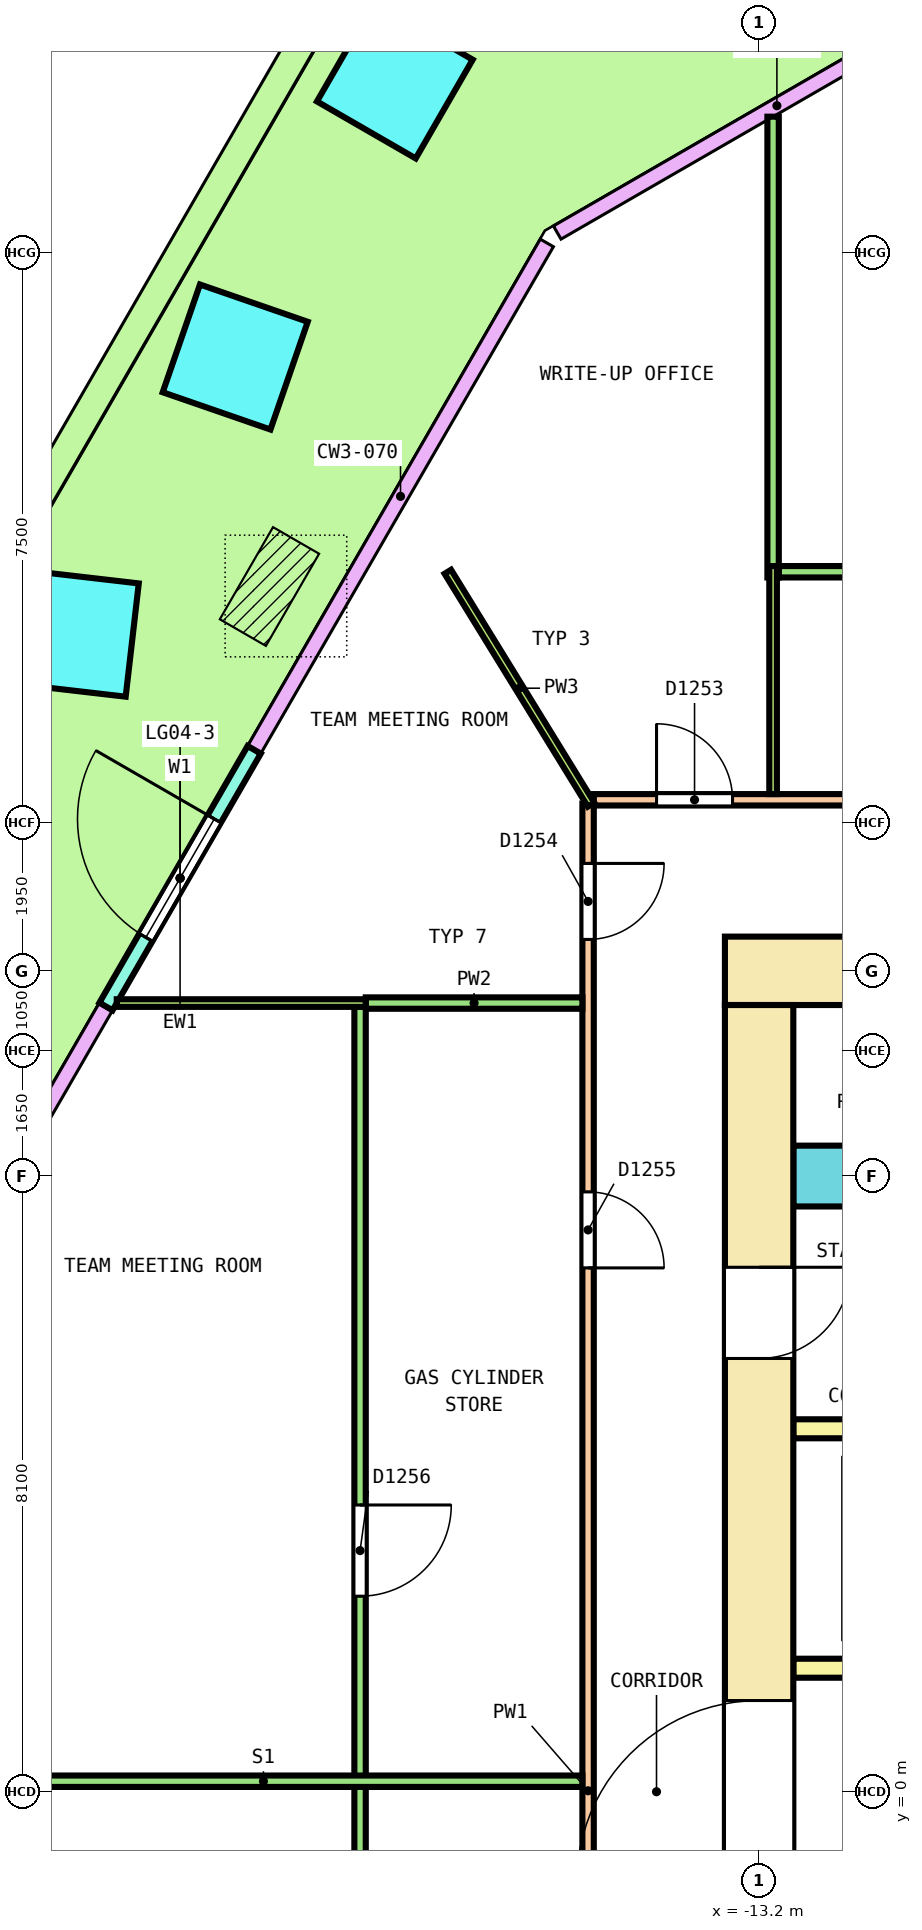
"""IFC4 building model, lengths in metres.
Left out: names, types, materials, properties, quantities, classifications, styles, units other than length and angle.
Written with IfcOpenShell. Run it as: python <this file> out.ifc"""

import sys

from ifc_helpers import new_model, si_unit, direction, frame, frame_2d, origin, origin_2d, place, context, subcontext, project, spatial, rectangle, extrude, element, fill, save


model = new_model("IFC4")
c1 = context("Model", 3, precision=1e-05, world=origin(), true_north=direction((0.0, 1.0)))
c2 = subcontext(c1, "Body", "Model", "MODEL_VIEW")
j1 = project(units=[si_unit("LENGTHUNIT", "METRE"), si_unit("PLANEANGLEUNIT", "RADIAN")], contexts=[c1])
p1 = place(None, origin())
s1 = spatial("IfcSite", under=j1, at=p1, CompositionType="ELEMENT")
p2 = place(p1, origin())
s2 = spatial("IfcBuilding", under=s1, at=p2, CompositionType="ELEMENT")
p3 = place(p2, frame((0.0, 0.0, 19.0)))
s3 = spatial("IfcBuildingStorey", under=s2, at=p3, CompositionType="ELEMENT", Elevation=19.0)
p4 = place(p3, frame((-17.993, 22.512, 0.0), z_axis=(-0.036265236264, 0.0, 0.999342199969), x_axis=(-0.499424867419, -0.866167613071, -0.018123682572)))
e1 = element("IfcColumn", 1, at=p4, inside=s3, PredefinedType="COLUMN", context=c2, shape_type="SweptSolid", body=[
    extrude(rectangle(XDim=1.5, YDim=1.5, at=origin_2d()), origin(), (0.0, 0.0, 1.0), 4.053),
])
p5 = place(p3, frame((-20.093, 18.875, 0.0), z_axis=(-0.032654174822, 0.006325993277, 0.999446690262), x_axis=(-0.500478631698, -0.865680616164, -0.010872442804)))
e2 = element("IfcColumn", 2, at=p5, inside=s3, PredefinedType="COLUMN", context=c2, shape_type="SweptSolid", body=[
    extrude(rectangle(XDim=1.5, YDim=1.5, at=origin_2d()), origin(), (0.0, 0.0, 1.0), 4.052),
])
p6 = place(p3, frame((-22.193, 15.238, 0.0), z_axis=(-0.029040838643, 0.012592396839, 0.999498905068), x_axis=(-0.500555205851, -0.86569697754, -0.003637165647)))
e3 = element("IfcColumn", 3, at=p6, inside=s3, PredefinedType="COLUMN", context=c2, shape_type="SweptSolid", body=[
    extrude(rectangle(XDim=1.5, YDim=1.5, at=origin_2d()), origin(), (0.0, 0.0, 1.0), 4.052),
])
p7 = place(p3, frame((-19.843, 13.708, 0.0), z_axis=(0.0, 0.0, 1.0), x_axis=(-0.499997012787, -0.866027128446, 0.0)))
e4 = element("IfcWall", 4, at=p7, inside=s3, PredefinedType="SOLIDWALL", context=c2, shape_type="SweptSolid", body=[
    extrude(rectangle(XDim=3.9, YDim=0.2, at=frame_2d((1.95, 0.0))), origin(), (0.0, 0.0, 1.0), 4.1),
])
p8 = place(p7, frame((1.05, 0.0, 0.0)))
e5 = element("IfcOpeningElement", 5, at=p8, cuts=e4, PredefinedType="OPENING", context=c2, shape_type="SweptSolid", body=[
    extrude(rectangle(XDim=1.8, YDim=2.4, at=frame_2d((0.9, 1.2))), frame((0.0, 0.11, 0.0), z_axis=(0.0, -1.0, 0.0), x_axis=(1.0, 0.0, 0.0)), (0.0, 0.0, 1.0), 0.22),
])
p9 = place(p7, frame((1.05, 0.0, 2.55)))
e6 = element("IfcOpeningElement", 6, at=p9, cuts=e4, PredefinedType="OPENING", context=c2, shape_type="SweptSolid", body=[
    extrude(rectangle(XDim=1.8, YDim=0.45, at=frame_2d((0.9, 0.225))), frame((0.0, 0.11, 0.0), z_axis=(0.0, -1.0, 0.0), x_axis=(1.0, 0.0, 0.0)), (0.0, 0.0, 1.0), 0.22),
])
p10 = place(p3, frame((-13.65, 10.8, 0.0), z_axis=(0.0, 0.0, 1.0), x_axis=(1.0, 0.0, 0.0)))
e7 = element("IfcWall", 7, at=p10, inside=s3, PredefinedType="SHEAR", context=c2, shape_type="SweptSolid", body=[
    extrude(rectangle(XDim=27.3, YDim=0.9, at=frame_2d((13.65, 0.0))), origin(), (0.0, 0.0, 1.0), 4.1),
])
p11 = place(p10, frame((1.892, 0.0, 0.0)))
e8 = element("IfcOpeningElement", 8, at=p11, cuts=e7, PredefinedType="OPENING", context=c2, shape_type="SweptSolid", body=[
    extrude(rectangle(XDim=1.0, YDim=2.1, at=frame_2d((0.5, 1.05))), frame((0.0, 0.46, 0.0), z_axis=(0.0, -1.0, 0.0), x_axis=(1.0, 0.0, 0.0)), (0.0, 0.0, 1.0), 0.92),
])
p12 = place(p10, frame((4.97, 0.0, 0.0)))
e9 = element("IfcOpeningElement", 9, at=p12, cuts=e7, PredefinedType="OPENING", context=c2, shape_type="SweptSolid", body=[
    extrude(rectangle(XDim=1.0, YDim=2.1, at=frame_2d((0.5, 1.05))), frame((0.0, 0.46, 0.0), z_axis=(0.0, -1.0, 0.0), x_axis=(1.0, 0.0, 0.0)), (0.0, 0.0, 1.0), 0.92),
])
p13 = place(p10, frame((8.017, 0.0, 0.0)))
e10 = element("IfcOpeningElement", 10, at=p13, cuts=e7, PredefinedType="OPENING", context=c2, shape_type="SweptSolid", body=[
    extrude(rectangle(XDim=1.0, YDim=2.1, at=frame_2d((0.5, 1.05))), frame((0.0, 0.46, 0.0), z_axis=(0.0, -1.0, 0.0), x_axis=(1.0, 0.0, 0.0)), (0.0, 0.0, 1.0), 0.92),
])
p14 = place(p10, frame((11.064, 0.0, 0.0)))
e11 = element("IfcOpeningElement", 11, at=p14, cuts=e7, PredefinedType="OPENING", context=c2, shape_type="SweptSolid", body=[
    extrude(rectangle(XDim=1.0, YDim=2.1, at=frame_2d((0.5, 1.05))), frame((0.0, 0.46, 0.0), z_axis=(0.0, -1.0, 0.0), x_axis=(1.0, 0.0, 0.0)), (0.0, 0.0, 1.0), 0.92),
])
p15 = place(p10, frame((18.077, 0.0, 0.0)))
e12 = element("IfcOpeningElement", 12, at=p15, cuts=e7, PredefinedType="OPENING", context=c2, shape_type="SweptSolid", body=[
    extrude(rectangle(XDim=1.0, YDim=2.1, at=frame_2d((0.5, 1.05))), frame((0.0, 0.46, 0.0), z_axis=(0.0, -1.0, 0.0), x_axis=(1.0, 0.0, 0.0)), (0.0, 0.0, 1.0), 0.92),
])
p16 = place(p10, frame((21.206, 0.0, 0.0)))
e13 = element("IfcOpeningElement", 13, at=p16, cuts=e7, PredefinedType="OPENING", context=c2, shape_type="SweptSolid", body=[
    extrude(rectangle(XDim=1.0, YDim=2.1, at=frame_2d((0.5, 1.05))), frame((0.0, 0.46, 0.0), z_axis=(0.0, -1.0, 0.0), x_axis=(1.0, 0.0, 0.0)), (0.0, 0.0, 1.0), 0.92),
])
p17 = place(p10, frame((24.367, 0.0, 0.0)))
e14 = element("IfcOpeningElement", 14, at=p17, cuts=e7, PredefinedType="OPENING", context=c2, shape_type="SweptSolid", body=[
    extrude(rectangle(XDim=1.0, YDim=2.1, at=frame_2d((0.5, 1.05))), frame((0.0, 0.46, 0.0), z_axis=(0.0, -1.0, 0.0), x_axis=(1.0, 0.0, 0.0)), (0.0, 0.0, 1.0), 0.92),
])
p18 = place(p10, frame((14.575, 0.0, 0.0)))
e15 = element("IfcOpeningElement", 15, at=p18, cuts=e7, PredefinedType="OPENING", context=c2, shape_type="SweptSolid", body=[
    extrude(rectangle(XDim=1.4, YDim=2.1, at=frame_2d((0.7, 1.05))), frame((0.0, 0.46, 0.0), z_axis=(0.0, -1.0, 0.0), x_axis=(1.0, 0.0, 0.0)), (0.0, 0.0, 1.0), 0.92),
])
p19 = place(p3, frame((-13.2, -10.35, 0.0), z_axis=(0.0, 0.0, 1.0), x_axis=(0.0, 1.0, 0.0)))
e16 = element("IfcWall", 16, at=p19, inside=s3, PredefinedType="SHEAR", context=c2, shape_type="SweptSolid", body=[
    extrude(rectangle(XDim=20.7, YDim=0.9, at=frame_2d((10.35, 0.0))), origin(), (0.0, 0.0, 1.0), 4.1),
])
p20 = place(p19, frame((9.15, 0.0, 0.0)))
e17 = element("IfcOpeningElement", 17, at=p20, cuts=e16, PredefinedType="OPENING", context=c2, shape_type="SweptSolid", body=[
    extrude(rectangle(XDim=2.4, YDim=2.1, at=frame_2d((1.2, 1.05))), frame((0.0, 0.46, 0.0), z_axis=(0.0, -1.0, 0.0), x_axis=(1.0, 0.0, 0.0)), (0.0, 0.0, 1.0), 0.92),
])
p21 = place(p19, frame((16.05, 0.0, 0.0)))
e18 = element("IfcOpeningElement", 18, at=p21, cuts=e16, PredefinedType="OPENING", context=c2, shape_type="SweptSolid", body=[
    extrude(rectangle(XDim=1.2, YDim=2.1, at=frame_2d((0.6, 1.05))), frame((0.0, 0.46, 0.0), z_axis=(0.0, -1.0, 0.0), x_axis=(1.0, 0.0, 0.0)), (0.0, 0.0, 1.0), 0.92),
])
p22 = place(p19, frame((3.45, 0.0, 0.0)))
e19 = element("IfcOpeningElement", 19, at=p22, cuts=e16, PredefinedType="OPENING", context=c2, shape_type="SweptSolid", body=[
    extrude(rectangle(XDim=1.2, YDim=2.1, at=frame_2d((0.6, 1.05))), frame((0.0, 0.46, 0.0), z_axis=(0.0, -1.0, 0.0), x_axis=(1.0, 0.0, 0.0)), (0.0, 0.0, 1.0), 0.92),
])
p23 = place(p3, frame((-12.75, 8.1, 0.0), z_axis=(0.0, 0.0, 1.0), x_axis=(1.0, 0.0, 0.0)))
e20 = element("IfcWall", 20, at=p23, inside=s3, PredefinedType="SHEAR", context=c2, shape_type="SweptSolid", body=[
    extrude(rectangle(XDim=25.5, YDim=0.8, at=frame_2d((12.75, 0.0))), origin(), (0.0, 0.0, 1.0), 4.1),
])
p24 = place(p23, frame((13.675, 0.0, 0.0)))
e21 = element("IfcOpeningElement", 21, at=p24, cuts=e20, PredefinedType="OPENING", context=c2, shape_type="SweptSolid", body=[
    extrude(rectangle(XDim=1.4, YDim=2.1, at=frame_2d((0.7, 1.05))), frame((0.0, 0.41, 0.0), z_axis=(0.0, -1.0, 0.0), x_axis=(1.0, 0.0, 0.0)), (0.0, 0.0, 1.0), 0.82),
])
p25 = place(p3, frame((-12.75, 1.625, 0.0), z_axis=(0.0, 0.0, 1.0), x_axis=(1.0, 0.0, 0.0)))
e22 = element("IfcWall", 22, at=p25, inside=s3, PredefinedType="SOLIDWALL", context=c2, shape_type="SweptSolid", body=[
    extrude(rectangle(XDim=2.9, YDim=0.25, at=frame_2d((1.45, 0.0))), origin(), (0.0, 0.0, 1.0), 4.1),
])
p26 = place(p25, frame((0.9, 0.0, 0.0)))
e23 = element("IfcOpeningElement", 23, at=p26, cuts=e22, PredefinedType="OPENING", context=c2, shape_type="SweptSolid", body=[
    extrude(rectangle(XDim=1.1, YDim=2.1, at=frame_2d((0.55, 1.05))), frame((0.0, 0.135, 0.0), z_axis=(0.0, -1.0, 0.0), x_axis=(1.0, 0.0, 0.0)), (0.0, 0.0, 1.0), 0.27),
])
p27 = place(p3, frame((-12.75, 4.775, 0.0), z_axis=(0.0, 0.0, 1.0), x_axis=(1.0, 0.0, 0.0)))
e24 = element("IfcWall", 24, at=p27, inside=s3, PredefinedType="SOLIDWALL", context=c2, shape_type="SweptSolid", body=[
    extrude(rectangle(XDim=2.9, YDim=0.25, at=frame_2d((1.45, 0.0))), origin(), (0.0, 0.0, 1.0), 4.1),
])
p28 = place(p3, frame((-15.375, 13.05, 0.0), z_axis=(0.0, 0.0, 1.0), x_axis=(1.0, 0.0, 0.0)))
e25 = element("IfcWall", 25, at=p28, inside=s3, PredefinedType="PARTITIONING", context=c2, shape_type="SweptSolid", body=[
    extrude(rectangle(XDim=30.75, YDim=0.15, at=frame_2d((15.375, 0.0))), origin(), (0.0, 0.0, 1.0), 3.05),
])
p29 = place(p28, frame((27.608, 0.0, 0.0)))
e26 = element("IfcOpeningElement", 26, at=p29, cuts=e25, PredefinedType="OPENING", context=c2, shape_type="SweptSolid", body=[
    extrude(rectangle(XDim=1.0, YDim=2.1, at=frame_2d((0.5, 1.05))), frame((0.0, 0.085, 0.0), z_axis=(0.0, -1.0, 0.0), x_axis=(1.0, 0.0, 0.0)), (0.0, 0.0, 1.0), 0.17),
])
p30 = place(p28, frame((23.465, 0.0, 0.0)))
e27 = element("IfcOpeningElement", 27, at=p30, cuts=e25, PredefinedType="OPENING", context=c2, shape_type="SweptSolid", body=[
    extrude(rectangle(XDim=1.0, YDim=2.1, at=frame_2d((0.5, 1.05))), frame((0.0, 0.085, 0.0), z_axis=(0.0, -1.0, 0.0), x_axis=(1.0, 0.0, 0.0)), (0.0, 0.0, 1.0), 0.17),
])
p31 = place(p28, frame((17.695, 0.0, 0.0)))
e28 = element("IfcOpeningElement", 28, at=p31, cuts=e25, PredefinedType="OPENING", context=c2, shape_type="SweptSolid", body=[
    extrude(rectangle(XDim=1.2, YDim=2.1, at=frame_2d((0.6, 1.05))), frame((0.0, 0.085, 0.0), z_axis=(0.0, -1.0, 0.0), x_axis=(1.0, 0.0, 0.0)), (0.0, 0.0, 1.0), 0.17),
])
p32 = place(p28, frame((11.084, 0.0, 0.0)))
e29 = element("IfcOpeningElement", 29, at=p32, cuts=e25, PredefinedType="OPENING", context=c2, shape_type="SweptSolid", body=[
    extrude(rectangle(XDim=1.2, YDim=2.1, at=frame_2d((0.6, 1.05))), frame((0.0, 0.085, 0.0), z_axis=(0.0, -1.0, 0.0), x_axis=(1.0, 0.0, 0.0)), (0.0, 0.0, 1.0), 0.17),
])
p33 = place(p28, frame((6.158, 0.0, 0.0)))
e30 = element("IfcOpeningElement", 30, at=p33, cuts=e25, PredefinedType="OPENING", context=c2, shape_type="SweptSolid", body=[
    extrude(rectangle(XDim=1.0, YDim=2.1, at=frame_2d((0.5, 1.05))), frame((0.0, 0.085, 0.0), z_axis=(0.0, -1.0, 0.0), x_axis=(1.0, 0.0, 0.0)), (0.0, 0.0, 1.0), 0.17),
])
p34 = place(p28, frame((0.825, 0.0, 0.0)))
e31 = element("IfcOpeningElement", 31, at=p34, cuts=e25, PredefinedType="OPENING", context=c2, shape_type="SweptSolid", body=[
    extrude(rectangle(XDim=1.0, YDim=2.1, at=frame_2d((0.5, 1.05))), frame((0.0, 0.085, 0.0), z_axis=(0.0, -1.0, 0.0), x_axis=(1.0, 0.0, 0.0)), (0.0, 0.0, 1.0), 0.17),
])
p35 = place(p3, frame((-15.45, -12.975, 0.0), z_axis=(0.0, 0.0, 1.0), x_axis=(0.0, 1.0, 0.0)))
e32 = element("IfcWall", 32, at=p35, inside=s3, PredefinedType="PARTITIONING", context=c2, shape_type="SweptSolid", body=[
    extrude(rectangle(XDim=25.975, YDim=0.15, at=frame_2d((12.988, 0.0))), origin(), (0.0, 0.0, 1.0), 3.05),
])
p36 = place(p35, frame((24.188, 0.0, 0.0)))
e33 = element("IfcOpeningElement", 33, at=p36, cuts=e32, PredefinedType="OPENING", context=c2, shape_type="SweptSolid", body=[
    extrude(rectangle(XDim=1.0, YDim=2.1, at=frame_2d((0.5, 1.05))), frame((0.0, 0.085, 0.0), z_axis=(0.0, -1.0, 0.0), x_axis=(1.0, 0.0, 0.0)), (0.0, 0.0, 1.0), 0.17),
])
p37 = place(p35, frame((19.866, 0.0, 0.0)))
e34 = element("IfcOpeningElement", 34, at=p37, cuts=e32, PredefinedType="OPENING", context=c2, shape_type="SweptSolid", body=[
    extrude(rectangle(XDim=1.0, YDim=2.1, at=frame_2d((0.5, 1.05))), frame((0.0, 0.085, 0.0), z_axis=(0.0, -1.0, 0.0), x_axis=(1.0, 0.0, 0.0)), (0.0, 0.0, 1.0), 0.17),
])
p38 = place(p35, frame((8.717, 0.0, 0.0)))
e35 = element("IfcOpeningElement", 35, at=p38, cuts=e32, PredefinedType="OPENING", context=c2, shape_type="SweptSolid", body=[
    extrude(rectangle(XDim=1.0, YDim=2.1, at=frame_2d((0.5, 1.05))), frame((0.0, 0.085, 0.0), z_axis=(0.0, -1.0, 0.0), x_axis=(1.0, 0.0, 0.0)), (0.0, 0.0, 1.0), 0.17),
])
p39 = place(p35, frame((0.817, 0.0, 0.0)))
e36 = element("IfcOpeningElement", 36, at=p39, cuts=e32, PredefinedType="OPENING", context=c2, shape_type="SweptSolid", body=[
    extrude(rectangle(XDim=1.0, YDim=2.1, at=frame_2d((0.5, 1.05))), frame((0.0, 0.085, 0.0), z_axis=(0.0, -1.0, 0.0), x_axis=(1.0, 0.0, 0.0)), (0.0, 0.0, 1.0), 0.17),
])
p40 = place(p3, frame((-18.375, 10.376, 0.0), z_axis=(0.0, 0.0, 1.0), x_axis=(1.0, 0.0, 0.0)))
e37 = element("IfcWall", 37, at=p40, inside=s3, PredefinedType="PARTITIONING", context=c2, shape_type="SweptSolid", body=[
    extrude(rectangle(XDim=2.85, YDim=0.15, at=frame_2d((1.425, 0.0))), origin(), (0.0, 0.0, 1.0), 3.05),
])
p41 = place(p3, frame((-12.941, 16.05, 0.0), z_axis=(0.0, 0.0, 1.0), x_axis=(1.0, 0.0, 0.0)))
e38 = element("IfcWall", 38, at=p41, inside=s3, PredefinedType="PARTITIONING", context=c2, shape_type="SweptSolid", body=[
    extrude(rectangle(XDim=6.856, YDim=0.15, at=frame_2d((3.428, 0.0))), origin(), (0.0, 0.0, 1.0), 3.05),
])
p42 = place(p3, frame((-13.016, 15.975, 0.0), z_axis=(0.0, 0.0, 1.0), x_axis=(0.0, 1.0, 0.0)))
e39 = element("IfcWall", 39, at=p42, inside=s3, PredefinedType="PARTITIONING", context=c2, shape_type="SweptSolid", body=[
    extrude(rectangle(XDim=6.062, YDim=0.15, at=frame_2d((3.031, 0.0))), origin(), (0.0, 0.0, 1.0), 3.05),
])
p43 = place(p3, frame((-18.45, -10.19, 0.0), z_axis=(0.0, 0.0, 1.0), x_axis=(0.0, 1.0, 0.0)))
e40 = element("IfcWall", 40, at=p43, inside=s3, PredefinedType="PARTITIONING", context=c2, shape_type="SweptSolid", body=[
    extrude(rectangle(XDim=20.516, YDim=0.15, at=frame_2d((10.258, 0.0))), origin(), (0.0, 0.0, 1.0), 3.05),
])
p44 = place(p43, frame((12.763, 0.0, 0.0)))
e41 = element("IfcOpeningElement", 41, at=p44, cuts=e40, PredefinedType="OPENING", context=c2, shape_type="SweptSolid", body=[
    extrude(rectangle(XDim=1.2, YDim=2.1, at=frame_2d((0.6, 1.05))), frame((0.0, 0.085, 0.0), z_axis=(0.0, -1.0, 0.0), x_axis=(1.0, 0.0, 0.0)), (0.0, 0.0, 1.0), 0.17),
])
p45 = place(p3, frame((-25.593, 0.138, 0.0), z_axis=(0.0, 0.0, 1.0), x_axis=(1.0, 0.0, 0.0)))
e42 = element("IfcWall", 42, at=p45, inside=s3, PredefinedType="PARTITIONING", context=c2, shape_type="SweptSolid", body=[
    extrude(rectangle(XDim=10.068, YDim=0.15, at=frame_2d((5.034, 0.0))), origin(), (0.0, 0.0, 1.0), 3.05),
])
p46 = place(p45, frame((1.661, 0.0, 0.0)))
e43 = element("IfcOpeningElement", 43, at=p46, cuts=e42, PredefinedType="OPENING", context=c2, shape_type="SweptSolid", body=[
    extrude(rectangle(XDim=1.2, YDim=2.1, at=frame_2d((0.6, 1.05))), frame((0.0, 0.085, 0.0), z_axis=(0.0, -1.0, 0.0), x_axis=(1.0, 0.0, 0.0)), (0.0, 0.0, 1.0), 0.17),
])
p47 = place(p3, frame((-21.651, 10.376, 0.0), z_axis=(0.0, 0.0, 1.0), x_axis=(1.0, 0.0, 0.0)))
e44 = element("IfcWall", 44, at=p47, inside=s3, PredefinedType="PARTITIONING", context=c2, shape_type="SweptSolid", body=[
    extrude(rectangle(XDim=3.276, YDim=0.1, at=frame_2d((1.638, 0.0))), origin(), (0.0, 0.0, 1.0), 3.05),
])
p48 = place(p3, frame((-13.016, 13.125, 0.0), z_axis=(0.0, 0.0, 1.0), x_axis=(0.0, 1.0, 0.0)))
e45 = element("IfcWall", 45, at=p48, inside=s3, PredefinedType="PARTITIONING", context=c2, shape_type="SweptSolid", body=[
    extrude(rectangle(XDim=3.0, YDim=0.1, at=frame_2d((1.5, 0.0))), origin(), (0.0, 0.0, 1.0), 3.05),
])
p49 = place(p3, frame((-17.295, 16.05, 0.0), z_axis=(0.0, 0.0, 1.0), x_axis=(0.523945950868, -0.851751513394, 0.0)))
e46 = element("IfcWall", 46, at=p49, inside=s3, PredefinedType="PARTITIONING", context=c2, shape_type="SweptSolid", body=[
    extrude(rectangle(XDim=3.597, YDim=0.1, at=frame_2d((1.799, 0.0))), origin(), (0.0, 0.0, 1.0), 3.05),
])
p50 = place(p8, origin())
e47 = element("IfcDoor", 47, at=p50, inside=s3, OperationType="DOUBLE_DOOR_SINGLE_SWING", PredefinedType="DOOR", context=c2, shape_type="SweptSolid", body=[
    extrude(rectangle(XDim=1.8, YDim=2.4, at=frame_2d((0.9, 1.2))), frame((0.0, 0.025, 0.0), z_axis=(0.0, -1.0, 0.0), x_axis=(1.0, 0.0, 0.0)), (0.0, 0.0, 1.0), 0.05),
])
fill(e5, e47)
p51 = place(p9, origin())
e48 = element("IfcWindow", 48, at=p51, inside=s3, PartitioningType="SINGLE_PANEL", PredefinedType="WINDOW", context=c2, shape_type="SweptSolid", body=[
    extrude(rectangle(XDim=1.8, YDim=0.45, at=frame_2d((0.9, 0.225))), frame((0.0, 0.03, 0.0), z_axis=(0.0, -1.0, 0.0), x_axis=(1.0, 0.0, 0.0)), (0.0, 0.0, 1.0), 0.06),
])
fill(e6, e48)
p52 = place(p20, origin())
e49 = element("IfcDoor", 49, at=p52, inside=s3, OperationType="DOUBLE_DOOR_SINGLE_SWING", PredefinedType="DOOR", context=c2, shape_type="SweptSolid", body=[
    extrude(rectangle(XDim=2.4, YDim=2.1, at=frame_2d((1.2, 1.05))), frame((0.0, 0.3, 0.0), z_axis=(0.0, -1.0, 0.0), x_axis=(1.0, 0.0, 0.0)), (0.0, 0.0, 1.0), 0.6),
])
fill(e17, e49)
p53 = place(p21, origin())
e50 = element("IfcDoor", 50, at=p53, inside=s3, OperationType="SINGLE_SWING_LEFT", PredefinedType="DOOR", context=c2, shape_type="SweptSolid", body=[
    extrude(rectangle(XDim=1.2, YDim=2.1, at=frame_2d((0.6, 1.05))), frame((0.0, 0.3, 0.0), z_axis=(0.0, -1.0, 0.0), x_axis=(1.0, 0.0, 0.0)), (0.0, 0.0, 1.0), 0.6),
])
fill(e18, e50)
p54 = place(p34, origin())
e51 = element("IfcDoor", 51, at=p54, inside=s3, OperationType="SINGLE_SWING_RIGHT", PredefinedType="DOOR", context=c2, shape_type="SweptSolid", body=[
    extrude(rectangle(XDim=1.0, YDim=2.1, at=frame_2d((0.5, 1.05))), frame((0.0, 0.025, 0.0), z_axis=(0.0, -1.0, 0.0), x_axis=(1.0, 0.0, 0.0)), (0.0, 0.0, 1.0), 0.05),
])
fill(e31, e51)
p55 = place(p36, origin())
e52 = element("IfcDoor", 52, at=p55, inside=s3, OperationType="SINGLE_SWING_LEFT", PredefinedType="DOOR", context=c2, shape_type="SweptSolid", body=[
    extrude(rectangle(XDim=1.0, YDim=2.1, at=frame_2d((0.5, 1.05))), frame((0.0, 0.025, 0.0), z_axis=(0.0, -1.0, 0.0), x_axis=(1.0, 0.0, 0.0)), (0.0, 0.0, 1.0), 0.05),
])
fill(e33, e52)
p56 = place(p37, origin())
e53 = element("IfcDoor", 53, at=p56, inside=s3, OperationType="SINGLE_SWING_LEFT", PredefinedType="DOOR", context=c2, shape_type="SweptSolid", body=[
    extrude(rectangle(XDim=1.0, YDim=2.1, at=frame_2d((0.5, 1.05))), frame((0.0, 0.025, 0.0), z_axis=(0.0, -1.0, 0.0), x_axis=(1.0, 0.0, 0.0)), (0.0, 0.0, 1.0), 0.05),
])
fill(e34, e53)
p57 = place(p44, origin())
e54 = element("IfcDoor", 54, at=p57, inside=s3, OperationType="DOUBLE_DOOR_SINGLE_SWING", PredefinedType="DOOR", context=c2, shape_type="SweptSolid", body=[
    extrude(rectangle(XDim=1.2, YDim=2.1, at=frame_2d((0.6, 1.05))), frame((0.0, 0.025, 0.0), z_axis=(0.0, -1.0, 0.0), x_axis=(1.0, 0.0, 0.0)), (0.0, 0.0, 1.0), 0.05),
])
fill(e41, e54)
save(model, sys.argv[1])
